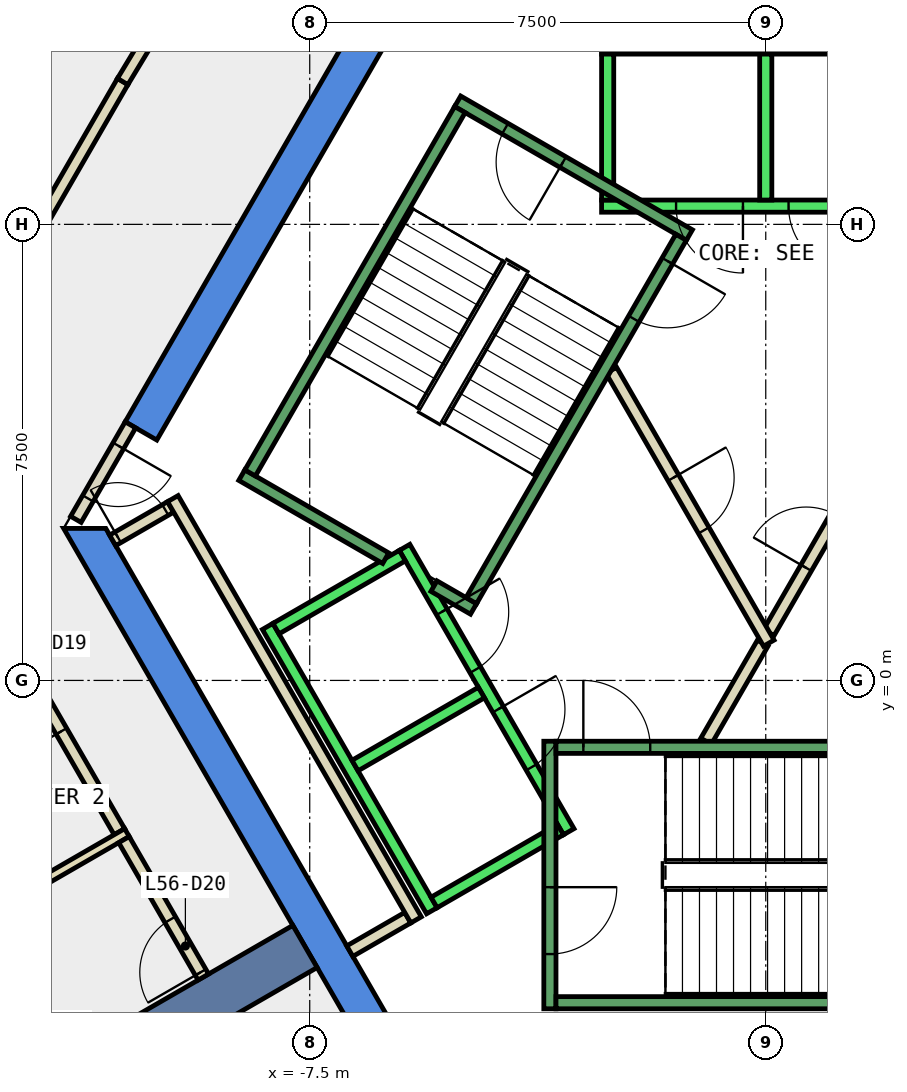
"""IFC4 building model, lengths in metres.
Left out: names, types, materials, properties, quantities, classifications, styles, units other than length and angle.
Written with IfcOpenShell. Run it as: python <this file> out.ifc"""

import sys

from ifc_helpers import new_model, si_unit, direction, frame, frame_2d, origin, place, context, subcontext, project, spatial, polyline, rectangle, outline, extrude, element, fill, save


model = new_model("IFC4")
c1 = context("Model", 3, precision=1e-05, world=origin(), true_north=direction((0.0, 1.0)))
c2 = subcontext(c1, "Body", "Model", "MODEL_VIEW")
j1 = project(units=[si_unit("LENGTHUNIT", "METRE"), si_unit("PLANEANGLEUNIT", "RADIAN")], contexts=[c1])
p1 = place(None, origin())
s1 = spatial("IfcSite", under=j1, at=p1, CompositionType="ELEMENT")
p2 = place(p1, origin())
s2 = spatial("IfcBuilding", under=s1, at=p2, CompositionType="ELEMENT")
p3 = place(p2, frame((0.0, 0.0, 248.6)))
s3 = spatial("IfcBuildingStorey", under=s2, at=p3, CompositionType="ELEMENT", Elevation=248.6)
p4 = place(p3, frame((0.0, 0.0, -0.34)))
e1 = element("IfcWall", 1, at=p4, inside=s3, PredefinedType="SHEAR", context=c2, shape_type="SweptSolid", body=[
    extrude(outline(polyline([(-10.535, 4.253), (-10.015, 3.953), (-5.427, 11.9), (-5.774, 12.5), (-10.535, 4.253)])), origin(), (0.0, 0.0, 1.0), 3.6),
])
p5 = place(p3, frame((0.0, 0.0, -0.34)))
e2 = element("IfcWall", 2, at=p5, inside=s3, PredefinedType="SHEAR", context=c2, shape_type="SweptSolid", body=[
    extrude(outline(polyline([(-11.547, 2.5), (-5.774, -7.5), (-5.427, -6.9), (-10.854, 2.5), (-11.547, 2.5)])), origin(), (0.0, 0.0, 1.0), 3.6),
])
p6 = place(p3, frame((-7.578, -4.375, -0.34), z_axis=(0.0, 0.0, 1.0), x_axis=(-0.866024315419, -0.5000018851, 0.0)))
e3 = element("IfcWall", 3, at=p6, inside=s3, PredefinedType="SHEAR", context=c2, shape_type="SweptSolid", body=[
    extrude(rectangle(XDim=9.0, YDim=0.8, at=frame_2d((4.5, 0.0))), origin(), (0.0, 0.0, 1.0), 3.6),
])
p7 = place(p3, frame((-10.63, -2.488, 0.0), z_axis=(0.0, 0.0, 1.0), x_axis=(-0.500108649621, 0.865962665808, 0.0)))
e4 = element("IfcWall", 4, at=p7, inside=s3, PredefinedType="PARTITIONING", context=c2, shape_type="SweptSolid", body=[
    extrude(rectangle(XDim=4.815, YDim=0.2, at=frame_2d((2.408, 0.0))), origin(), (0.0, 0.0, 1.0), 3.26),
])
p8 = place(p7, frame((1.908, 0.0, 0.0)))
e5 = element("IfcOpeningElement", 5, at=p8, cuts=e4, PredefinedType="OPENING", context=c2, shape_type="SweptSolid", body=[
    extrude(rectangle(XDim=1.0, YDim=2.1, at=frame_2d((0.5, 1.05))), frame((0.0, 0.11, 0.0), z_axis=(0.0, -1.0, 0.0), x_axis=(1.0, 0.0, 0.0)), (0.0, 0.0, 1.0), 0.22),
])
p9 = place(p3, frame((-12.159, 7.107, 0.0), z_axis=(0.0, 0.0, 1.0), x_axis=(0.499953838557, 0.866052053466, 0.0)))
e6 = element("IfcWall", 6, at=p9, inside=s3, PredefinedType="PARTITIONING", context=c2, shape_type="SweptSolid", body=[
    extrude(rectangle(XDim=3.166, YDim=0.2, at=frame_2d((1.583, 0.0))), origin(), (0.0, 0.0, 1.0), 3.26),
])
p10 = place(p3, frame((-10.576, 9.849, 0.0), z_axis=(0.0, 0.0, 1.0), x_axis=(0.517026085378, 0.855969641423, 0.0)))
e7 = element("IfcWall", 7, at=p10, inside=s3, PredefinedType="PARTITIONING", context=c2, shape_type="SweptSolid", body=[
    extrude(rectangle(XDim=6.408, YDim=0.2, at=frame_2d((3.204, 0.0))), origin(), (0.0, 0.0, 1.0), 3.26),
])
p11 = place(p10, frame((2.779, 0.0, 0.0)))
e8 = element("IfcOpeningElement", 8, at=p11, cuts=e7, PredefinedType="OPENING", context=c2, shape_type="SweptSolid", body=[
    extrude(rectangle(XDim=1.0, YDim=2.1, at=frame_2d((0.5, 1.05))), frame((0.0, 0.11, 0.0), z_axis=(0.0, -1.0, 0.0), x_axis=(1.0, 0.0, 0.0)), (0.0, 0.0, 1.0), 0.22),
])
p12 = place(p3, frame((-5.888, -3.902, 0.0), z_axis=(0.0, 0.0, 1.0), x_axis=(-0.86621513555, -0.499671230855, 0.0)))
e9 = element("IfcWall", 9, at=p12, inside=s3, PredefinedType="PARTITIONING", context=c2, shape_type="SweptSolid", body=[
    extrude(rectangle(XDim=1.1, YDim=0.2, at=frame_2d((0.55, 0.0))), origin(), (0.0, 0.0, 1.0), 3.26),
])
p13 = place(p3, frame((-10.741, 2.303, 0.0), z_axis=(0.0, 0.0, 1.0), x_axis=(0.866063652425, 0.499933745558, 0.0)))
e10 = element("IfcWall", 10, at=p13, inside=s3, PredefinedType="PARTITIONING", context=c2, shape_type="SweptSolid", body=[
    extrude(rectangle(XDim=1.1, YDim=0.2, at=frame_2d((0.55, 0.0))), origin(), (0.0, 0.0, 1.0), 3.26),
])
p14 = place(p13, frame((0.1, 0.0, 0.0)))
e11 = element("IfcOpeningElement", 11, at=p14, cuts=e10, PredefinedType="OPENING", context=c2, shape_type="SweptSolid", body=[
    extrude(rectangle(XDim=0.9, YDim=2.1, at=frame_2d((0.45, 1.05))), frame((0.0, 0.11, 0.0), z_axis=(0.0, -1.0, 0.0), x_axis=(1.0, 0.0, 0.0)), (0.0, 0.0, 1.0), 0.22),
])
p15 = place(p3, frame((-9.751, 2.99, 0.0), z_axis=(0.0, 0.0, 1.0), x_axis=(0.500012163284, -0.866018381195, 0.0)))
e12 = element("IfcWall", 12, at=p15, inside=s3, PredefinedType="PARTITIONING", context=c2, shape_type="SweptSolid", body=[
    extrude(rectangle(XDim=8.0, YDim=0.2, at=frame_2d((4.0, 0.0))), origin(), (0.0, 0.0, 1.0), 3.26),
])
p16 = place(p3, frame((-0.982, -1.0, 0.0), z_axis=(0.0, 0.0, 1.0), x_axis=(0.50024047865, 0.865886518847, 0.0)))
e13 = element("IfcWall", 13, at=p16, inside=s3, PredefinedType="PARTITIONING", context=c2, shape_type="SweptSolid", body=[
    extrude(rectangle(XDim=1.863, YDim=0.2, at=frame_2d((0.931, 0.0))), origin(), (0.0, 0.0, 1.0), 3.26),
])
p17 = place(p3, frame((0.05, 0.787, 0.0), z_axis=(0.0, 0.0, 1.0), x_axis=(0.499954076797, 0.866051915934, 0.0)))
e14 = element("IfcWall", 14, at=p17, inside=s3, PredefinedType="PARTITIONING", context=c2, shape_type="SweptSolid", body=[
    extrude(rectangle(XDim=3.558, YDim=0.2, at=frame_2d((1.779, 0.0))), origin(), (0.0, 0.0, 1.0), 3.26),
])
p18 = place(p17, frame((1.229, 0.0, 0.0)))
e15 = element("IfcOpeningElement", 15, at=p18, cuts=e14, PredefinedType="OPENING", context=c2, shape_type="SweptSolid", body=[
    extrude(rectangle(XDim=1.0, YDim=2.1, at=frame_2d((0.5, 1.05))), frame((0.0, 0.11, 0.0), z_axis=(0.0, -1.0, 0.0), x_axis=(1.0, 0.0, 0.0)), (0.0, 0.0, 1.0), 0.22),
])
p19 = place(p3, frame((-2.54, 5.1, 0.0), z_axis=(0.0, 0.0, 1.0), x_axis=(0.499925051871, -0.866068670783, 0.0)))
e16 = element("IfcWall", 16, at=p19, inside=s3, PredefinedType="PARTITIONING", context=c2, shape_type="SweptSolid", body=[
    extrude(rectangle(XDim=5.181, YDim=0.2, at=frame_2d((2.59, 0.0))), origin(), (0.0, 0.0, 1.0), 3.26),
])
p20 = place(p19, frame((2.04, 0.0, 0.0)))
e17 = element("IfcOpeningElement", 17, at=p20, cuts=e16, PredefinedType="OPENING", context=c2, shape_type="SweptSolid", body=[
    extrude(rectangle(XDim=1.0, YDim=2.1, at=frame_2d((0.5, 1.05))), frame((0.0, 0.11, 0.0), z_axis=(0.0, -1.0, 0.0), x_axis=(1.0, 0.0, 0.0)), (0.0, 0.0, 1.0), 0.22),
])
p21 = place(p3, frame((-10.506, -2.503, 0.0), z_axis=(0.0, 0.0, 1.0), x_axis=(-0.866044872465, -0.49996627774, 0.0)))
e18 = element("IfcWall", 18, at=p21, inside=s3, PredefinedType="PARTITIONING", context=c2, shape_type="SweptSolid", body=[
    extrude(rectangle(XDim=5.2, YDim=0.15, at=frame_2d((2.6, 0.0))), origin(), (0.0, 0.0, 1.0), 3.26),
])
p22 = place(p3, frame((-10.449, 4.203, 0.0), z_axis=(0.0, 0.0, 1.0), x_axis=(-0.499914839587, -0.866074565589, 0.0)))
e19 = element("IfcWall", 19, at=p22, inside=s3, PredefinedType="PARTITIONING", context=c2, shape_type="SweptSolid", body=[
    extrude(rectangle(XDim=1.794, YDim=0.2, at=frame_2d((0.897, 0.0))), origin(), (0.0, 0.0, 1.0), 2.4),
])
p23 = place(p22, frame((0.397, 0.0, 0.0)))
e20 = element("IfcOpeningElement", 20, at=p23, cuts=e19, PredefinedType="OPENING", context=c2, shape_type="SweptSolid", body=[
    extrude(rectangle(XDim=1.0, YDim=2.1, at=frame_2d((0.5, 1.05))), frame((0.0, 0.11, 0.0), z_axis=(0.0, -1.0, 0.0), x_axis=(1.0, 0.0, 0.0)), (0.0, 0.0, 1.0), 0.22),
])
p24 = place(p3, frame((-9.25, -4.878, 0.0), z_axis=(0.0, 0.0, 1.0), x_axis=(-0.500032875382, 0.866006422342, 0.0)))
e21 = element("IfcWall", 21, at=p24, inside=s3, PredefinedType="PARTITIONING", context=c2, shape_type="SweptSolid", body=[
    extrude(rectangle(XDim=2.61, YDim=0.2, at=frame_2d((1.305, 0.0))), origin(), (0.0, 0.0, 1.0), 3.26),
])
p25 = place(p24, frame((0.09, 0.0, 0.0)))
e22 = element("IfcOpeningElement", 22, at=p25, cuts=e21, PredefinedType="OPENING", context=c2, shape_type="SweptSolid", body=[
    extrude(rectangle(XDim=1.0, YDim=2.1, at=frame_2d((0.5, 1.05))), frame((0.0, 0.11, 0.0), z_axis=(0.0, -1.0, 0.0), x_axis=(1.0, 0.0, 0.0)), (0.0, 0.0, 1.0), 0.22),
])
p26 = place(p3, frame((2.7, 7.8, 0.0), z_axis=(0.0, 0.0, 1.0), x_axis=(-1.0, 0.0, 0.0)))
e23 = element("IfcWall", 23, at=p26, inside=s3, PredefinedType="STANDARD", context=c2, shape_type="SweptSolid", body=[
    extrude(rectangle(XDim=5.4, YDim=0.2, at=frame_2d((2.7, 0.0))), origin(), (0.0, 0.0, 1.0), 3.26),
])
p27 = place(p26, frame((1.225, 0.0, 0.0)))
e24 = element("IfcOpeningElement", 24, at=p27, cuts=e23, PredefinedType="OPENING", context=c2, shape_type="SweptSolid", body=[
    extrude(rectangle(XDim=1.1, YDim=2.1, at=frame_2d((0.55, 1.05))), frame((0.0, 0.11, 0.0), z_axis=(0.0, -1.0, 0.0), x_axis=(1.0, 0.0, 0.0)), (0.0, 0.0, 1.0), 0.22),
])
p28 = place(p26, frame((3.075, 0.0, 0.0)))
e25 = element("IfcOpeningElement", 25, at=p28, cuts=e23, PredefinedType="OPENING", context=c2, shape_type="SweptSolid", body=[
    extrude(rectangle(XDim=1.1, YDim=2.1, at=frame_2d((0.55, 1.05))), frame((0.0, 0.11, 0.0), z_axis=(0.0, -1.0, 0.0), x_axis=(1.0, 0.0, 0.0)), (0.0, 0.0, 1.0), 0.22),
])
p29 = place(p3, frame((2.7, 10.4, 0.0), z_axis=(0.0, 0.0, 1.0), x_axis=(-1.0, 0.0, 0.0)))
e26 = element("IfcWall", 26, at=p29, inside=s3, PredefinedType="STANDARD", context=c2, shape_type="SweptSolid", body=[
    extrude(rectangle(XDim=5.4, YDim=0.2, at=frame_2d((2.7, 0.0))), origin(), (0.0, 0.0, 1.0), 3.26),
])
for number, where, z_axis, x_axis in (
    (27, (0.0, 7.9, 0.0), (0.0, 0.0, 1.0), (0.0, 1.0, 0.0)),
    (28, (-2.6, 7.9, 0.0), (0.0, 0.0, 1.0), (0.0, 1.0, 0.0)),
):
    element("IfcWall", number, at=place(p3, frame(where, z_axis=z_axis, x_axis=x_axis)), inside=s3, PredefinedType="STANDARD", context=c2, shape_type="SweptSolid", body=[
        extrude(rectangle(XDim=2.4, YDim=0.2, at=frame_2d((1.2, 0.0))), origin(), (0.0, 0.0, 1.0), 3.26),
    ])
p30 = place(p3, frame((-5.94, 2.188, 0.0), z_axis=(0.0, 0.0, 1.0), x_axis=(0.500034260056, -0.866005622828, 0.0)))
e29 = element("IfcWall", 29, at=p30, inside=s3, PredefinedType="STANDARD", context=c2, shape_type="SweptSolid", body=[
    extrude(rectangle(XDim=5.399, YDim=0.2, at=frame_2d((2.7, 0.0))), origin(), (0.0, 0.0, 1.0), 3.26),
])
p31 = place(p30, frame((3.075, 0.0, 0.0)))
e30 = element("IfcOpeningElement", 30, at=p31, cuts=e29, PredefinedType="OPENING", context=c2, shape_type="SweptSolid", body=[
    extrude(rectangle(XDim=1.1, YDim=2.1, at=frame_2d((0.55, 1.05))), frame((0.0, 0.11, 0.0), z_axis=(0.0, -1.0, 0.0), x_axis=(1.0, 0.0, 0.0)), (0.0, 0.0, 1.0), 0.22),
])
p32 = place(p30, frame((1.225, 0.0, 0.0)))
e31 = element("IfcOpeningElement", 31, at=p32, cuts=e29, PredefinedType="OPENING", context=c2, shape_type="SweptSolid", body=[
    extrude(rectangle(XDim=1.1, YDim=2.1, at=frame_2d((0.55, 1.05))), frame((0.0, 0.11, 0.0), z_axis=(0.0, -1.0, 0.0), x_axis=(1.0, 0.0, 0.0)), (0.0, 0.0, 1.0), 0.22),
])
p33 = place(p3, frame((-8.192, 0.888, 0.0), z_axis=(0.0, 0.0, 1.0), x_axis=(0.500034260056, -0.866005622828, 0.0)))
e32 = element("IfcWall", 32, at=p33, inside=s3, PredefinedType="STANDARD", context=c2, shape_type="SweptSolid", body=[
    extrude(rectangle(XDim=5.399, YDim=0.2, at=frame_2d((2.7, 0.0))), origin(), (0.0, 0.0, 1.0), 3.26),
])
for number, where, z_axis, x_axis in (
    (33, (-5.977, 2.052, 0.0), (0.0, 0.0, 1.0), (-0.866, -0.5, 0.0)),
    (34, (-4.677, -0.2, 0.0), (0.0, 0.0, 1.0), (-0.866, -0.5, 0.0)),
):
    element("IfcWall", number, at=place(p3, frame(where, z_axis=z_axis, x_axis=x_axis)), inside=s3, PredefinedType="STANDARD", context=c2, shape_type="SweptSolid", body=[
        extrude(rectangle(XDim=2.399, YDim=0.2, at=frame_2d((1.2, 0.0))), origin(), (0.0, 0.0, 1.0), 3.26),
    ])
p34 = place(p3, frame((-3.377, -2.452, 0.0), z_axis=(0.0, 0.0, 1.0), x_axis=(-0.865955154139, -0.50012165622, 0.0)))
e35 = element("IfcWall", 35, at=p34, inside=s3, PredefinedType="STANDARD", context=c2, shape_type="SweptSolid", body=[
    extrude(rectangle(XDim=2.4, YDim=0.2, at=frame_2d((1.2, 0.0))), origin(), (0.0, 0.0, 1.0), 3.26),
])
p35 = place(p3, frame((-3.55, -1.0, 0.0), z_axis=(0.0, 0.0, 1.0), x_axis=(0.0, -1.0, 0.0)))
e36 = element("IfcWall", 36, at=p35, inside=s3, PredefinedType="STANDARD", context=c2, shape_type="SweptSolid", body=[
    extrude(rectangle(XDim=4.4, YDim=0.2, at=frame_2d((2.2, 0.0))), origin(), (0.0, 0.0, 1.0), 3.26),
])
p36 = place(p35, frame((2.4, 0.0, 0.0)))
e37 = element("IfcOpeningElement", 37, at=p36, cuts=e36, PredefinedType="OPENING", context=c2, shape_type="SweptSolid", body=[
    extrude(rectangle(XDim=1.1, YDim=2.2, at=frame_2d((0.55, 1.1))), frame((0.0, 0.11, 0.0), z_axis=(0.0, -1.0, 0.0), x_axis=(1.0, 0.0, 0.0)), (0.0, 0.0, 1.0), 0.22),
])
p37 = place(p3, frame((-3.45, -1.1, 0.0), z_axis=(0.0, 0.0, 1.0), x_axis=(1.0, 0.0, 0.0)))
e38 = element("IfcWall", 38, at=p37, inside=s3, PredefinedType="STANDARD", context=c2, shape_type="SweptSolid", body=[
    extrude(rectangle(XDim=6.9, YDim=0.2, at=frame_2d((3.45, 0.0))), origin(), (0.0, 0.0, 1.0), 3.26),
])
p38 = place(p37, frame((0.45, 0.0, 0.0)))
e39 = element("IfcOpeningElement", 39, at=p38, cuts=e38, PredefinedType="OPENING", context=c2, shape_type="SweptSolid", body=[
    extrude(rectangle(XDim=1.1, YDim=2.2, at=frame_2d((0.55, 1.1))), frame((0.0, 0.11, 0.0), z_axis=(0.0, -1.0, 0.0), x_axis=(1.0, 0.0, 0.0)), (0.0, 0.0, 1.0), 0.22),
])
p39 = place(p3, frame((-3.45, -5.3, 0.0), z_axis=(0.0, 0.0, 1.0), x_axis=(1.0, 0.0, 0.0)))
e40 = element("IfcWall", 40, at=p39, inside=s3, PredefinedType="STANDARD", context=c2, shape_type="SweptSolid", body=[
    extrude(rectangle(XDim=6.9, YDim=0.2, at=frame_2d((3.45, 0.0))), origin(), (0.0, 0.0, 1.0), 3.26),
])
p40 = place(p3, frame((-1.256, 7.324, 0.0), z_axis=(0.0, 0.0, 1.0), x_axis=(-0.866046073146, 0.499964197906, 0.0)))
e41 = element("IfcWall", 41, at=p40, inside=s3, PredefinedType="STANDARD", context=c2, shape_type="SweptSolid", body=[
    extrude(rectangle(XDim=4.4, YDim=0.2, at=frame_2d((2.2, 0.0))), origin(), (0.0, 0.0, 1.0), 3.26),
])
p41 = place(p40, frame((2.4, 0.0, 0.0)))
e42 = element("IfcOpeningElement", 42, at=p41, cuts=e41, PredefinedType="OPENING", context=c2, shape_type="SweptSolid", body=[
    extrude(rectangle(XDim=1.1, YDim=2.2, at=frame_2d((0.55, 1.1))), frame((0.0, 0.11, 0.0), z_axis=(0.0, -1.0, 0.0), x_axis=(1.0, 0.0, 0.0)), (0.0, 0.0, 1.0), 0.22),
])
p42 = place(p3, frame((-6.25, 2.01, 0.0), z_axis=(0.0, 0.0, 1.0), x_axis=(-0.86611865017, 0.499838457731, 0.0)))
e43 = element("IfcWall", 43, at=p42, inside=s3, PredefinedType="STANDARD", context=c2, shape_type="SweptSolid", body=[
    extrude(rectangle(XDim=2.733, YDim=0.2, at=frame_2d((1.366, 0.0))), origin(), (0.0, 0.0, 1.0), 3.26),
])
p43 = place(p3, frame((-4.806, 1.176, 0.0), z_axis=(0.0, 0.0, 1.0), x_axis=(-0.866558586415, 0.499075361355, 0.0)))
e44 = element("IfcWall", 44, at=p43, inside=s3, PredefinedType="STANDARD", context=c2, shape_type="SweptSolid", body=[
    extrude(rectangle(XDim=0.751, YDim=0.2, at=frame_2d((0.376, 0.0))), origin(), (0.0, 0.0, 1.0), 3.26),
])
p44 = place(p3, frame((-1.393, 7.288, 0.0), z_axis=(0.0, 0.0, 1.0), x_axis=(-0.499963383562, -0.866046543262, 0.0)))
e45 = element("IfcWall", 45, at=p44, inside=s3, PredefinedType="STANDARD", context=c2, shape_type="SweptSolid", body=[
    extrude(rectangle(XDim=6.9, YDim=0.2, at=frame_2d((3.45, 0.0))), origin(), (0.0, 0.0, 1.0), 3.26),
])
p45 = place(p44, frame((0.45, 0.0, 0.0)))
e46 = element("IfcOpeningElement", 46, at=p45, cuts=e45, PredefinedType="OPENING", context=c2, shape_type="SweptSolid", body=[
    extrude(rectangle(XDim=1.1, YDim=2.2, at=frame_2d((0.55, 1.1))), frame((0.0, 0.11, 0.0), z_axis=(0.0, -1.0, 0.0), x_axis=(1.0, 0.0, 0.0)), (0.0, 0.0, 1.0), 0.22),
])
p46 = place(p3, frame((-5.03, 9.388, 0.0), z_axis=(0.0, 0.0, 1.0), x_axis=(-0.499978703459, -0.866037698999, 0.0)))
e47 = element("IfcWall", 47, at=p46, inside=s3, PredefinedType="STANDARD", context=c2, shape_type="SweptSolid", body=[
    extrude(rectangle(XDim=6.9, YDim=0.2, at=frame_2d((3.45, 0.0))), origin(), (0.0, 0.0, 1.0), 3.26),
])
p47 = place(p8, origin())
e48 = element("IfcDoor", 48, at=p47, inside=s3, OperationType="SINGLE_SWING_LEFT", PredefinedType="DOOR", context=c2, shape_type="SweptSolid", body=[
    extrude(rectangle(XDim=1.0, YDim=2.1, at=frame_2d((0.5, 1.05))), frame((0.0, 0.025, 0.0), z_axis=(0.0, -1.0, 0.0), x_axis=(1.0, 0.0, 0.0)), (0.0, 0.0, 1.0), 0.05),
])
fill(e5, e48)
p48 = place(p25, origin())
e49 = element("IfcDoor", 49, at=p48, inside=s3, OperationType="SINGLE_SWING_LEFT", PredefinedType="DOOR", context=c2, shape_type="SweptSolid", body=[
    extrude(rectangle(XDim=1.0, YDim=2.1, at=frame_2d((0.5, 1.05))), frame((0.0, 0.025, 0.0), z_axis=(0.0, -1.0, 0.0), x_axis=(1.0, 0.0, 0.0)), (0.0, 0.0, 1.0), 0.05),
])
fill(e22, e49)
p49 = place(p18, origin())
e50 = element("IfcDoor", 50, at=p49, inside=s3, OperationType="SINGLE_SWING_RIGHT", PredefinedType="DOOR", context=c2, shape_type="SweptSolid", body=[
    extrude(rectangle(XDim=1.0, YDim=2.1, at=frame_2d((0.5, 1.05))), frame((0.0, 0.025, 0.0), z_axis=(0.0, -1.0, 0.0), x_axis=(1.0, 0.0, 0.0)), (0.0, 0.0, 1.0), 0.05),
])
fill(e15, e50)
p50 = place(p20, origin())
e51 = element("IfcDoor", 51, at=p50, inside=s3, OperationType="SINGLE_SWING_RIGHT", PredefinedType="DOOR", context=c2, shape_type="SweptSolid", body=[
    extrude(rectangle(XDim=1.0, YDim=2.1, at=frame_2d((0.5, 1.05))), frame((0.0, 0.025, 0.0), z_axis=(0.0, -1.0, 0.0), x_axis=(1.0, 0.0, 0.0)), (0.0, 0.0, 1.0), 0.05),
])
fill(e17, e51)
p51 = place(p14, origin())
e52 = element("IfcDoor", 52, at=p51, inside=s3, OperationType="SINGLE_SWING_RIGHT", PredefinedType="DOOR", context=c2, shape_type="SweptSolid", body=[
    extrude(rectangle(XDim=0.9, YDim=2.1, at=frame_2d((0.45, 1.05))), frame((0.0, 0.025, 0.0), z_axis=(0.0, -1.0, 0.0), x_axis=(1.0, 0.0, 0.0)), (0.0, 0.0, 1.0), 0.05),
])
fill(e11, e52)
p52 = place(p23, origin())
e53 = element("IfcDoor", 53, at=p52, inside=s3, OperationType="SINGLE_SWING_LEFT", PredefinedType="DOOR", context=c2, shape_type="SweptSolid", body=[
    extrude(rectangle(XDim=1.0, YDim=2.1, at=frame_2d((0.5, 1.05))), frame((0.0, 0.025, 0.0), z_axis=(0.0, -1.0, 0.0), x_axis=(1.0, 0.0, 0.0)), (0.0, 0.0, 1.0), 0.05),
])
fill(e20, e53)
p53 = place(p27, origin())
e54 = element("IfcDoor", 54, at=p53, inside=s3, OperationType="SLIDING_TO_LEFT", PredefinedType="DOOR", context=c2, shape_type="SweptSolid", body=[
    extrude(rectangle(XDim=1.1, YDim=2.1, at=frame_2d((0.55, 1.05))), frame((0.0, 0.025, 0.0), z_axis=(0.0, -1.0, 0.0), x_axis=(1.0, 0.0, 0.0)), (0.0, 0.0, 1.0), 0.05),
])
fill(e24, e54)
p54 = place(p28, origin())
e55 = element("IfcDoor", 55, at=p54, inside=s3, OperationType="SLIDING_TO_LEFT", PredefinedType="DOOR", context=c2, shape_type="SweptSolid", body=[
    extrude(rectangle(XDim=1.1, YDim=2.1, at=frame_2d((0.55, 1.05))), frame((0.0, 0.025, 0.0), z_axis=(0.0, -1.0, 0.0), x_axis=(1.0, 0.0, 0.0)), (0.0, 0.0, 1.0), 0.05),
])
fill(e25, e55)
p55 = place(p31, origin())
e56 = element("IfcDoor", 56, at=p55, inside=s3, OperationType="SLIDING_TO_LEFT", PredefinedType="DOOR", context=c2, shape_type="SweptSolid", body=[
    extrude(rectangle(XDim=1.1, YDim=2.1, at=frame_2d((0.55, 1.05))), frame((0.0, 0.025, 0.0), z_axis=(0.0, -1.0, 0.0), x_axis=(1.0, 0.0, 0.0)), (0.0, 0.0, 1.0), 0.05),
])
fill(e30, e56)
p56 = place(p32, origin())
e57 = element("IfcDoor", 57, at=p56, inside=s3, OperationType="SLIDING_TO_LEFT", PredefinedType="DOOR", context=c2, shape_type="SweptSolid", body=[
    extrude(rectangle(XDim=1.1, YDim=2.1, at=frame_2d((0.55, 1.05))), frame((0.0, 0.025, 0.0), z_axis=(0.0, -1.0, 0.0), x_axis=(1.0, 0.0, 0.0)), (0.0, 0.0, 1.0), 0.05),
])
fill(e31, e57)
p57 = place(p38, origin())
e58 = element("IfcDoor", 58, at=p57, inside=s3, OperationType="SINGLE_SWING_LEFT", PredefinedType="DOOR", context=c2, shape_type="SweptSolid", body=[
    extrude(rectangle(XDim=1.1, YDim=2.2, at=frame_2d((0.55, 1.1))), frame((0.0, 0.025, 0.0), z_axis=(0.0, -1.0, 0.0), x_axis=(1.0, 0.0, 0.0)), (0.0, 0.0, 1.0), 0.05),
])
fill(e39, e58)
p58 = place(p36, origin())
e59 = element("IfcDoor", 59, at=p58, inside=s3, OperationType="SINGLE_SWING_LEFT", PredefinedType="DOOR", context=c2, shape_type="SweptSolid", body=[
    extrude(rectangle(XDim=1.1, YDim=2.2, at=frame_2d((0.55, 1.1))), frame((0.0, 0.025, 0.0), z_axis=(0.0, -1.0, 0.0), x_axis=(1.0, 0.0, 0.0)), (0.0, 0.0, 1.0), 0.05),
])
fill(e37, e59)
p59 = place(p45, origin())
e60 = element("IfcDoor", 60, at=p59, inside=s3, OperationType="SINGLE_SWING_LEFT", PredefinedType="DOOR", context=c2, shape_type="SweptSolid", body=[
    extrude(rectangle(XDim=1.1, YDim=2.2, at=frame_2d((0.55, 1.1))), frame((0.0, 0.025, 0.0), z_axis=(0.0, -1.0, 0.0), x_axis=(1.0, 0.0, 0.0)), (0.0, 0.0, 1.0), 0.05),
])
fill(e46, e60)
p60 = place(p41, origin())
e61 = element("IfcDoor", 61, at=p60, inside=s3, OperationType="SINGLE_SWING_LEFT", PredefinedType="DOOR", context=c2, shape_type="SweptSolid", body=[
    extrude(rectangle(XDim=1.1, YDim=2.2, at=frame_2d((0.55, 1.1))), frame((0.0, 0.025, 0.0), z_axis=(0.0, -1.0, 0.0), x_axis=(1.0, 0.0, 0.0)), (0.0, 0.0, 1.0), 0.05),
])
fill(e42, e61)
save(model, sys.argv[1])
